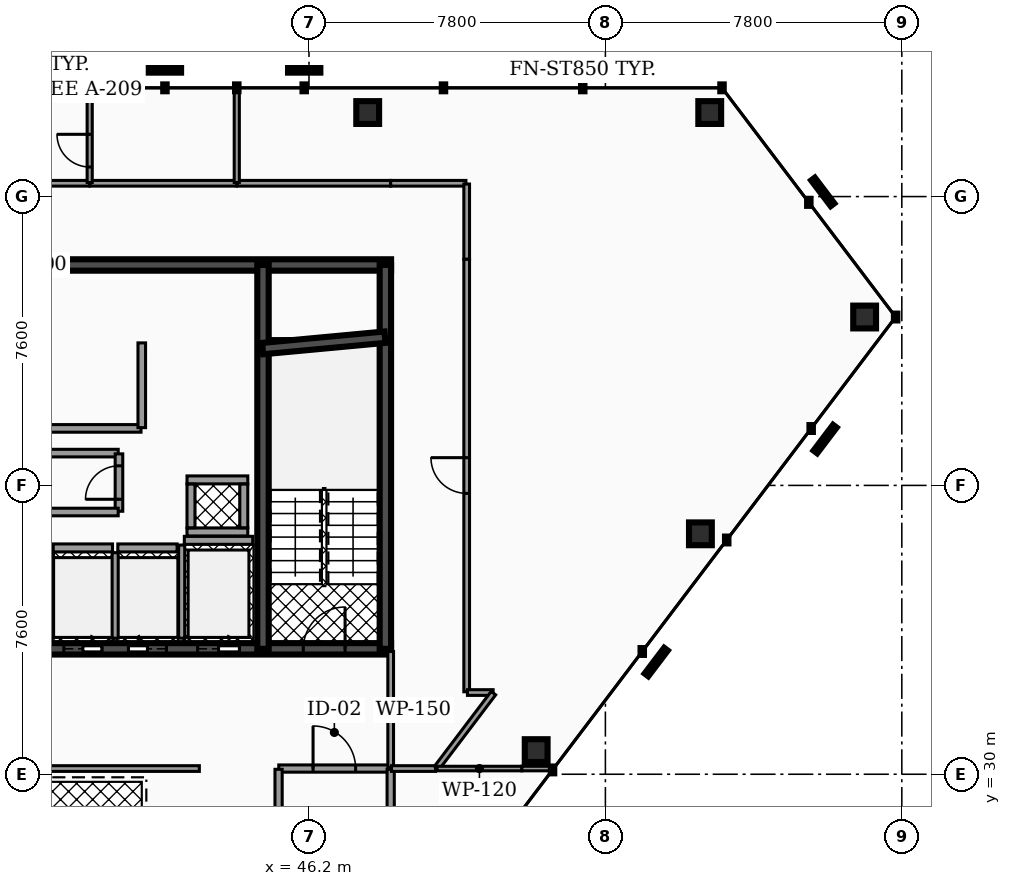
"""IFC4 building model, lengths in metres.
Left out: names, types, materials, properties, quantities, classifications, styles, units other than length and angle.
Written with IfcOpenShell. Run it as: python <this file> out.ifc"""

import sys

from ifc_helpers import new_model, si_unit, direction, frame, frame_2d, origin, origin_2d, place, context, subcontext, project, spatial, rectangle, hollow_rectangle, extrude, element, fill, save


model = new_model("IFC4")
c1 = context("Model", 3, precision=1e-05, world=origin(), true_north=direction((0.0, 1.0)))
c2 = subcontext(c1, "Body", "Model", "MODEL_VIEW")
j1 = project(units=[si_unit("LENGTHUNIT", "METRE"), si_unit("PLANEANGLEUNIT", "RADIAN")], contexts=[c1])
p1 = place(None, origin())
s1 = spatial("IfcSite", under=j1, at=p1, CompositionType="ELEMENT")
p2 = place(p1, origin())
s2 = spatial("IfcBuilding", under=s1, at=p2, CompositionType="ELEMENT")
p3 = place(p2, frame((0.0, 0.0, 242.76)))
s3 = spatial("IfcBuildingStorey", under=s2, at=p3, CompositionType="ELEMENT", Elevation=242.76)
p4 = place(p3, frame((28.5, 43.4, 0.0), z_axis=(0.0, 0.0, 1.0), x_axis=(1.0, 0.0, 0.0)))
e1 = element("IfcWall", 1, at=p4, inside=s3, PredefinedType="SHEAR", context=c2, shape_type="SweptSolid", body=[
    extrude(rectangle(XDim=19.86, YDim=0.3, at=frame_2d((9.93, 0.0))), origin(), (0.0, 0.0, 1.0), 3.18),
])
p5 = place(p3, frame((28.5, 33.3, 0.0), z_axis=(0.0, 0.0, 1.0), x_axis=(1.0, 0.0, 0.0)))
e2 = element("IfcWall", 2, at=p5, inside=s3, PredefinedType="SHEAR", context=c2, shape_type="SweptSolid", body=[
    extrude(rectangle(XDim=19.86, YDim=0.3, at=frame_2d((9.93, 0.0))), origin(), (0.0, 0.0, 1.0), 3.18),
])
p6 = place(p5, frame((3.93, 0.0, 0.0)))
e3 = element("IfcOpeningElement", 3, at=p6, cuts=e2, PredefinedType="OPENING", context=c2, shape_type="SweptSolid", body=[
    extrude(rectangle(XDim=1.1, YDim=2.15, at=frame_2d((0.55, 1.075))), frame((0.0, 0.16, 0.0), z_axis=(0.0, -1.0, 0.0), x_axis=(1.0, 0.0, 0.0)), (0.0, 0.0, 1.0), 0.32),
])
p7 = place(p5, frame((14.77, 0.0, 0.0)))
e4 = element("IfcOpeningElement", 4, at=p7, cuts=e2, PredefinedType="OPENING", context=c2, shape_type="SweptSolid", body=[
    extrude(rectangle(XDim=1.1, YDim=2.15, at=frame_2d((0.55, 1.075))), frame((0.0, 0.16, 0.0), z_axis=(0.0, -1.0, 0.0), x_axis=(1.0, 0.0, 0.0)), (0.0, 0.0, 1.0), 0.32),
])
p8 = place(p5, frame((11.25, 0.0, 0.0)))
e5 = element("IfcOpeningElement", 5, at=p8, cuts=e2, PredefinedType="OPENING", context=c2, shape_type="SweptSolid", body=[
    extrude(rectangle(XDim=1.0, YDim=2.1, at=frame_2d((0.5, 1.05))), frame((0.0, 0.16, 0.0), z_axis=(0.0, -1.0, 0.0), x_axis=(1.0, 0.0, 0.0)), (0.0, 0.0, 1.0), 0.32),
])
p9 = place(p5, frame((12.95, 0.0, 0.0)))
e6 = element("IfcOpeningElement", 6, at=p9, cuts=e2, PredefinedType="OPENING", context=c2, shape_type="SweptSolid", body=[
    extrude(rectangle(XDim=1.0, YDim=2.1, at=frame_2d((0.5, 1.05))), frame((0.0, 0.16, 0.0), z_axis=(0.0, -1.0, 0.0), x_axis=(1.0, 0.0, 0.0)), (0.0, 0.0, 1.0), 0.32),
])
p10 = place(p5, frame((5.85, 0.0, 0.0)))
e7 = element("IfcOpeningElement", 7, at=p10, cuts=e2, PredefinedType="OPENING", context=c2, shape_type="SweptSolid", body=[
    extrude(rectangle(XDim=1.0, YDim=2.1, at=frame_2d((0.5, 1.05))), frame((0.0, 0.16, 0.0), z_axis=(0.0, -1.0, 0.0), x_axis=(1.0, 0.0, 0.0)), (0.0, 0.0, 1.0), 0.32),
])
p11 = place(p5, frame((1.21, 0.0, 0.0)))
e8 = element("IfcOpeningElement", 8, at=p11, cuts=e2, PredefinedType="OPENING", context=c2, shape_type="SweptSolid", body=[
    extrude(rectangle(XDim=1.1, YDim=2.2, at=frame_2d((0.55, 1.1))), frame((0.0, 0.16, 0.0), z_axis=(0.0, -1.0, 0.0), x_axis=(1.0, 0.0, 0.0)), (0.0, 0.0, 1.0), 0.32),
])
p12 = place(p5, frame((9.34, 0.0, 0.0)))
e9 = element("IfcOpeningElement", 9, at=p12, cuts=e2, PredefinedType="OPENING", context=c2, shape_type="SweptSolid", body=[
    extrude(rectangle(XDim=1.12, YDim=2.05, at=frame_2d((0.56, 1.025))), frame((0.0, 0.16, 0.0), z_axis=(0.0, -1.0, 0.0), x_axis=(1.0, 0.0, 0.0)), (0.0, 0.0, 1.0), 0.32),
])
p13 = place(p5, frame((17.55, 0.0, 0.0)))
e10 = element("IfcOpeningElement", 10, at=p13, cuts=e2, PredefinedType="OPENING", context=c2, shape_type="SweptSolid", body=[
    extrude(rectangle(XDim=1.1, YDim=2.2, at=frame_2d((0.55, 1.1))), frame((0.0, 0.16, 0.0), z_axis=(0.0, -1.0, 0.0), x_axis=(1.0, 0.0, 0.0)), (0.0, 0.0, 1.0), 0.32),
])
for number, where, z_axis, x_axis in (
    (11, (44.99, 33.3, 0.0), (0.0, 0.0, 1.0), (0.0, 1.0, 0.0)),
    (12, (48.21, 33.3, 0.0), (0.0, 0.0, 1.0), (0.0, 1.0, 0.0)),
):
    element("IfcWall", number, at=place(p3, frame(where, z_axis=z_axis, x_axis=x_axis)), inside=s3, PredefinedType="SHEAR", context=c2, shape_type="SweptSolid", body=[
        extrude(rectangle(XDim=10.1, YDim=0.3, at=frame_2d((5.05, 0.0))), origin(), (0.0, 0.0, 1.0), 3.18),
    ])
p14 = place(p3, frame((44.98, 41.2, 0.0), z_axis=(0.0, 0.0, 1.0), x_axis=(0.995686468965, 0.09278176286, 0.0)))
e13 = element("IfcWall", 13, at=p14, inside=s3, PredefinedType="SHEAR", context=c2, shape_type="SweptSolid", body=[
    extrude(rectangle(XDim=3.234, YDim=0.3, at=frame_2d((1.617, 0.0))), origin(), (0.0, 0.0, 1.0), 3.18),
])
for number, where, z_axis, x_axis in (
    (14, (56.746, 47.411, 0.0), (0.0, 0.0, 1.0), (1.0, 0.0, 0.0)),
    (15, (47.745, 47.411, 0.0), (0.0, 0.0, 1.0), (1.0, 0.0, 0.0)),
    (16, (52.178, 30.622, 0.0), (0.0, 0.0, 1.0), (1.0, 0.0, 0.0)),
    (17, (56.5, 36.326, 0.0), (0.0, 0.0, 1.0), (1.0, 0.0, 0.0)),
    (18, (60.822, 42.031, 0.0), (0.0, 0.0, 1.0), (1.0, 0.0, 0.0)),
):
    element("IfcColumn", number, at=place(p3, frame(where, z_axis=z_axis, x_axis=x_axis)), inside=s3, PredefinedType="COLUMN", context=c2, shape_type="SweptSolid", body=[
        extrude(hollow_rectangle(XDim=0.6, YDim=0.6, WallThickness=0.03, at=origin_2d()), origin(), (0.0, 0.0, 1.0), 3.18),
    ])
p15 = place(p3, frame((42.92, 36.155, 0.0), z_axis=(0.0, 0.0, 1.0), x_axis=(1.0, 0.0, 0.0)))
e19 = element("IfcWall", 19, at=p15, inside=s3, PredefinedType="SOLIDWALL", context=c2, shape_type="SweptSolid", body=[
    extrude(rectangle(XDim=1.8, YDim=0.21, at=frame_2d((0.9, 0.0))), origin(), (0.0, 0.0, 1.0), 3.18),
])
p16 = place(p3, frame((42.85, 33.58, 0.0), z_axis=(0.0, 0.0, 1.0), x_axis=(0.0, 1.0, 0.0)))
e20 = element("IfcWall", 20, at=p16, inside=s3, PredefinedType="SOLIDWALL", context=c2, shape_type="SweptSolid", body=[
    extrude(rectangle(XDim=2.45, YDim=0.16, at=frame_2d((1.225, 0.0))), origin(), (0.0, 0.0, 1.0), 3.18),
])
p17 = place(p3, frame((39.47, 35.955, 0.0), z_axis=(0.0, 0.0, 1.0), x_axis=(1.0, 0.0, 0.0)))
e21 = element("IfcWall", 21, at=p17, inside=s3, PredefinedType="SOLIDWALL", context=c2, shape_type="SweptSolid", body=[
    extrude(rectangle(XDim=1.56, YDim=0.21, at=frame_2d((0.78, 0.0))), origin(), (0.0, 0.0, 1.0), 3.18),
])
for number, where, z_axis, x_axis in (
    (22, (39.4, 33.58, 0.0), (0.0, 0.0, 1.0), (0.0, 1.0, 0.0)),
    (23, (41.1, 33.58, 0.0), (0.0, 0.0, 1.0), (0.0, 1.0, 0.0)),
):
    element("IfcWall", number, at=place(p3, frame(where, z_axis=z_axis, x_axis=x_axis)), inside=s3, PredefinedType="SOLIDWALL", context=c2, shape_type="SweptSolid", body=[
        extrude(rectangle(XDim=2.25, YDim=0.16, at=frame_2d((1.125, 0.0))), origin(), (0.0, 0.0, 1.0), 3.18),
    ])
p18 = place(p3, frame((41.17, 35.955, 0.0), z_axis=(0.0, 0.0, 1.0), x_axis=(1.0, 0.0, 0.0)))
e24 = element("IfcWall", 24, at=p18, inside=s3, PredefinedType="SOLIDWALL", context=c2, shape_type="SweptSolid", body=[
    extrude(rectangle(XDim=1.56, YDim=0.21, at=frame_2d((0.78, 0.0))), origin(), (0.0, 0.0, 1.0), 3.18),
])
for number, where, z_axis, x_axis in (
    (25, (42.99, 36.375, 0.0), (0.0, 0.0, 1.0), (1.0, 0.0, 0.0)),
    (26, (42.99, 37.745, 0.0), (0.0, 0.0, 1.0), (1.0, 0.0, 0.0)),
):
    element("IfcWall", number, at=place(p3, frame(where, z_axis=z_axis, x_axis=x_axis)), inside=s3, PredefinedType="SOLIDWALL", context=c2, shape_type="SweptSolid", body=[
        extrude(rectangle(XDim=1.6, YDim=0.21, at=frame_2d((0.8, 0.0))), origin(), (0.0, 0.0, 1.0), 3.18),
    ])
for number, where, z_axis, x_axis in (
    (27, (43.095, 36.485, 0.0), (0.0, 0.0, 1.0), (0.0, 1.0, 0.0)),
    (28, (44.485, 36.485, 0.0), (0.0, 0.0, 1.0), (0.0, 1.0, 0.0)),
):
    element("IfcWall", number, at=place(p3, frame(where, z_axis=z_axis, x_axis=x_axis)), inside=s3, PredefinedType="SOLIDWALL", context=c2, shape_type="SweptSolid", body=[
        extrude(rectangle(XDim=1.15, YDim=0.21, at=frame_2d((0.575, 0.0))), origin(), (0.0, 0.0, 1.0), 3.18),
    ])
p19 = place(p3, frame((39.27, 38.45, 0.0), z_axis=(0.0, 0.0, 1.0), x_axis=(1.0, 0.0, 0.0)))
e29 = element("IfcWall", 29, at=p19, inside=s3, PredefinedType="PARTITIONING", context=c2, shape_type="SweptSolid", body=[
    extrude(rectangle(XDim=1.91, YDim=0.2, at=frame_2d((0.955, 0.0))), origin(), (0.0, 0.0, 1.0), 2.235),
])
p20 = place(p3, frame((41.2, 36.92, 0.0), z_axis=(0.0, 0.0, 1.0), x_axis=(0.0, 1.0, 0.0)))
e30 = element("IfcWall", 30, at=p20, inside=s3, PredefinedType="PARTITIONING", context=c2, shape_type="SweptSolid", body=[
    extrude(rectangle(XDim=1.51, YDim=0.2, at=frame_2d((0.755, 0.0))), origin(), (0.0, 0.0, 1.0), 2.235),
])
p21 = place(p20, frame((0.315, 0.0, 0.0)))
e31 = element("IfcOpeningElement", 31, at=p21, cuts=e30, PredefinedType="OPENING", context=c2, shape_type="SweptSolid", body=[
    extrude(rectangle(XDim=0.88, YDim=2.05, at=frame_2d((0.44, 1.025))), frame((0.0, 0.11, 0.0), z_axis=(0.0, -1.0, 0.0), x_axis=(1.0, 0.0, 0.0)), (0.0, 0.0, 1.0), 0.22),
])
p22 = place(p3, frame((39.27, 36.9, 0.0), z_axis=(0.0, 0.0, 1.0), x_axis=(1.0, 0.0, 0.0)))
e32 = element("IfcWall", 32, at=p22, inside=s3, PredefinedType="PARTITIONING", context=c2, shape_type="SweptSolid", body=[
    extrude(rectangle(XDim=1.91, YDim=0.2, at=frame_2d((0.955, 0.0))), origin(), (0.0, 0.0, 1.0), 2.235),
])
p23 = place(p3, frame((39.27, 39.1, 0.0), z_axis=(0.0, 0.0, 1.0), x_axis=(1.0, 0.0, 0.0)))
e33 = element("IfcWall", 33, at=p23, inside=s3, PredefinedType="PARTITIONING", context=c2, shape_type="SweptSolid", body=[
    extrude(rectangle(XDim=2.51, YDim=0.2, at=frame_2d((1.255, 0.0))), origin(), (0.0, 0.0, 1.0), 2.235),
])
p24 = place(p3, frame((41.8, 39.12, 0.0), z_axis=(0.0, 0.0, 1.0), x_axis=(0.0, 1.0, 0.0)))
e34 = element("IfcWall", 34, at=p24, inside=s3, PredefinedType="PARTITIONING", context=c2, shape_type="SweptSolid", body=[
    extrude(rectangle(XDim=2.23, YDim=0.2, at=frame_2d((1.115, 0.0))), origin(), (0.0, 0.0, 1.0), 2.235),
])
p25 = place(p3, frame((45.405, 30.15, 0.0), z_axis=(0.0, 0.0, 1.0), x_axis=(1.0, 0.0, 0.0)))
e35 = element("IfcWall", 35, at=p25, inside=s3, PredefinedType="PARTITIONING", context=c2, shape_type="SweptSolid", body=[
    extrude(rectangle(XDim=2.925, YDim=0.19, at=frame_2d((1.462, 0.0))), origin(), (0.0, 0.0, 1.0), 2.235),
])
p26 = place(p25, frame((0.903, 0.0, 0.0)))
e36 = element("IfcOpeningElement", 36, at=p26, cuts=e35, PredefinedType="OPENING", context=c2, shape_type="SweptSolid", body=[
    extrude(rectangle(XDim=1.12, YDim=2.05, at=frame_2d((0.56, 1.025))), frame((0.0, 0.105, 0.0), z_axis=(0.0, -1.0, 0.0), x_axis=(1.0, 0.0, 0.0)), (0.0, 0.0, 1.0), 0.21),
])
p27 = place(p3, frame((48.35, 30.17, 0.0), z_axis=(0.0, 0.0, 1.0), x_axis=(0.0, 1.0, 0.0)))
e37 = element("IfcWall", 37, at=p27, inside=s3, PredefinedType="PARTITIONING", context=c2, shape_type="SweptSolid", body=[
    extrude(rectangle(XDim=3.06, YDim=0.15, at=frame_2d((1.53, 0.0))), origin(), (0.0, 0.0, 1.0), 2.235),
])
p28 = place(p3, frame((33.485, 30.15, 0.0), z_axis=(0.0, 0.0, 1.0), x_axis=(1.0, 0.0, 0.0)))
e38 = element("IfcWall", 38, at=p28, inside=s3, PredefinedType="PARTITIONING", context=c2, shape_type="SweptSolid", body=[
    extrude(rectangle(XDim=9.83, YDim=0.15, at=frame_2d((4.915, 0.0))), origin(), (0.0, 0.0, 1.0), 2.235),
])
p29 = place(p28, frame((0.445, 0.0, 0.0)))
e39 = element("IfcOpeningElement", 39, at=p29, cuts=e38, PredefinedType="OPENING", context=c2, shape_type="SweptSolid", body=[
    extrude(rectangle(XDim=0.94, YDim=2.05, at=frame_2d((0.47, 1.025))), frame((0.0, 0.085, 0.0), z_axis=(0.0, -1.0, 0.0), x_axis=(1.0, 0.0, 0.0)), (0.0, 0.0, 1.0), 0.17),
])
for number, where, z_axis, x_axis in (
    (40, (45.4, 27.37, 0.0), (0.0, 0.0, 1.0), (0.0, 1.0, 0.0)),
    (41, (48.35, 27.37, 0.0), (0.0, 0.0, 1.0), (0.0, 1.0, 0.0)),
):
    element("IfcWall", number, at=place(p3, frame(where, z_axis=z_axis, x_axis=x_axis)), inside=s3, PredefinedType="PARTITIONING", context=c2, shape_type="SweptSolid", body=[
        extrude(rectangle(XDim=2.76, YDim=0.19, at=frame_2d((1.38, 0.0))), origin(), (0.0, 0.0, 1.0), 2.235),
    ])
p30 = place(p3, frame((48.37, 30.15, 0.0), z_axis=(0.0, 0.0, 1.0), x_axis=(1.0, 0.0, 0.0)))
e42 = element("IfcWall", 42, at=p30, inside=s3, PredefinedType="PARTITIONING", context=c2, shape_type="SweptSolid", body=[
    extrude(rectangle(XDim=1.16, YDim=0.15, at=frame_2d((0.58, 0.0))), origin(), (0.0, 0.0, 1.0), 2.235),
])
p31 = place(p3, frame((44.305, 45.55, 0.0), z_axis=(0.0, 0.0, 1.0), x_axis=(1.0, 0.0, 0.0)))
e43 = element("IfcWall", 43, at=p31, inside=s3, PredefinedType="PARTITIONING", context=c2, shape_type="SweptSolid", body=[
    extrude(rectangle(XDim=4.045, YDim=0.15, at=frame_2d((2.022, 0.0))), origin(), (0.0, 0.0, 1.0), 2.235),
])
for number, where, z_axis, x_axis in (
    (44, (48.35, 45.55, 0.0), (0.0, 0.0, 1.0), (1.0, 0.0, 0.0)),
    (45, (50.35, 43.55, 0.0), (0.0, 0.0, 1.0), (0.0, 1.0, 0.0)),
):
    element("IfcWall", number, at=place(p3, frame(where, z_axis=z_axis, x_axis=x_axis)), inside=s3, PredefinedType="PARTITIONING", context=c2, shape_type="SweptSolid", body=[
        extrude(rectangle(XDim=1.98, YDim=0.15, at=frame_2d((0.99, 0.0))), origin(), (0.0, 0.0, 1.0), 2.235),
    ])
p32 = place(p3, frame((50.35, 32.17, 0.0), z_axis=(0.0, 0.0, 1.0), x_axis=(0.0, 1.0, 0.0)))
e46 = element("IfcWall", 46, at=p32, inside=s3, PredefinedType="PARTITIONING", context=c2, shape_type="SweptSolid", body=[
    extrude(rectangle(XDim=11.38, YDim=0.15, at=frame_2d((5.69, 0.0))), origin(), (0.0, 0.0, 1.0), 2.235),
])
p33 = place(p32, frame((5.22, 0.0, 0.0)))
e47 = element("IfcOpeningElement", 47, at=p33, cuts=e46, PredefinedType="OPENING", context=c2, shape_type="SweptSolid", body=[
    extrude(rectangle(XDim=0.94, YDim=2.05, at=frame_2d((0.47, 1.025))), frame((0.0, 0.085, 0.0), z_axis=(0.0, -1.0, 0.0), x_axis=(1.0, 0.0, 0.0)), (0.0, 0.0, 1.0), 0.17),
])
p34 = place(p3, frame((50.37, 32.15, 0.0), z_axis=(0.0, 0.0, 1.0), x_axis=(1.0, 0.0, 0.0)))
e48 = element("IfcWall", 48, at=p34, inside=s3, PredefinedType="PARTITIONING", context=c2, shape_type="SweptSolid", body=[
    extrude(rectangle(XDim=0.675, YDim=0.15, at=frame_2d((0.338, 0.0))), origin(), (0.0, 0.0, 1.0), 2.235),
])
p35 = place(p3, frame((49.562, 30.166, 0.0), z_axis=(0.0, 0.0, 1.0), x_axis=(0.603806281462, 0.797131089889, 0.0)))
e49 = element("IfcWall", 49, at=p35, inside=s3, PredefinedType="PARTITIONING", context=c2, shape_type="SweptSolid", body=[
    extrude(rectangle(XDim=2.469, YDim=0.15, at=frame_2d((1.234, 0.0))), origin(), (0.0, 0.0, 1.0), 2.235),
])
p36 = place(p3, frame((34.629, 45.55, 0.0), z_axis=(0.0, 0.0, 1.0), x_axis=(1.0, 0.0, 0.0)))
e50 = element("IfcWall", 50, at=p36, inside=s3, PredefinedType="PARTITIONING", context=c2, shape_type="SweptSolid", body=[
    extrude(rectangle(XDim=5.796, YDim=0.15, at=frame_2d((2.898, 0.0))), origin(), (0.0, 0.0, 1.0), 2.235),
])
p37 = place(p36, frame((2.428, 0.0, 0.0)))
e51 = element("IfcOpeningElement", 51, at=p37, cuts=e50, PredefinedType="OPENING", context=c2, shape_type="SweptSolid", body=[
    extrude(rectangle(XDim=0.94, YDim=2.05, at=frame_2d((0.47, 1.025))), frame((0.0, 0.085, 0.0), z_axis=(0.0, -1.0, 0.0), x_axis=(1.0, 0.0, 0.0)), (0.0, 0.0, 1.0), 0.17),
])
p38 = place(p3, frame((40.435, 45.55, 0.0), z_axis=(0.0, 0.0, 1.0), x_axis=(1.0, 0.0, 0.0)))
e52 = element("IfcWall", 52, at=p38, inside=s3, PredefinedType="PARTITIONING", context=c2, shape_type="SweptSolid", body=[
    extrude(rectangle(XDim=3.86, YDim=0.15, at=frame_2d((1.93, 0.0))), origin(), (0.0, 0.0, 1.0), 2.235),
])
p39 = place(p3, frame((49.57, 30.15, 0.0), z_axis=(0.0, 0.0, 1.0), x_axis=(1.0, 0.0, 0.0)))
e53 = element("IfcWall", 53, at=p39, inside=s3, PredefinedType="PARTITIONING", context=c2, shape_type="SweptSolid", body=[
    extrude(rectangle(XDim=2.23, YDim=0.12, at=frame_2d((1.115, 0.0))), origin(), (0.0, 0.0, 1.0), 2.235),
])
p40 = place(p3, frame((51.8, 30.15, 0.0), z_axis=(0.0, 0.0, 1.0), x_axis=(1.0, 0.0, 0.0)))
e54 = element("IfcWall", 54, at=p40, inside=s3, PredefinedType="PARTITIONING", context=c2, shape_type="SweptSolid", body=[
    extrude(rectangle(XDim=0.822, YDim=0.12, at=frame_2d((0.411, 0.0))), origin(), (0.0, 0.0, 1.0), 2.235),
])
p41 = place(p3, frame((44.3, 45.57, 0.0), z_axis=(0.0, 0.0, 1.0), x_axis=(0.0, 1.0, 0.0)))
e55 = element("IfcWall", 55, at=p41, inside=s3, PredefinedType="PARTITIONING", context=c2, shape_type="SweptSolid", body=[
    extrude(rectangle(XDim=2.476, YDim=0.135, at=frame_2d((1.238, 0.0))), origin(), (0.0, 0.0, 1.0), 2.235),
])
p42 = place(p3, frame((40.43, 45.57, 0.0), z_axis=(0.0, 0.0, 1.0), x_axis=(0.0, 1.0, 0.0)))
e56 = element("IfcWall", 56, at=p42, inside=s3, PredefinedType="PARTITIONING", context=c2, shape_type="SweptSolid", body=[
    extrude(rectangle(XDim=2.476, YDim=0.135, at=frame_2d((1.238, 0.0))), origin(), (0.0, 0.0, 1.0), 2.235),
])
p43 = place(p42, frame((0.408, 0.0, 0.0)))
e57 = element("IfcOpeningElement", 57, at=p43, cuts=e56, PredefinedType="OPENING", context=c2, shape_type="SweptSolid", body=[
    extrude(rectangle(XDim=0.86, YDim=2.05, at=frame_2d((0.43, 1.025))), frame((0.0, 0.077, 0.0), z_axis=(0.0, -1.0, 0.0), x_axis=(1.0, 0.0, 0.0)), (0.0, 0.0, 1.0), 0.155),
])
p44 = place(p7, origin())
e58 = element("IfcDoor", 58, at=p44, inside=s3, OperationType="SLIDING_TO_RIGHT", PredefinedType="DOOR", context=c2, shape_type="SweptSolid", body=[
    extrude(rectangle(XDim=1.1, YDim=2.15, at=frame_2d((0.55, 1.075))), frame((0.0, 0.025, 0.0), z_axis=(0.0, -1.0, 0.0), x_axis=(1.0, 0.0, 0.0)), (0.0, 0.0, 1.0), 0.05),
])
fill(e4, e58)
p45 = place(p8, origin())
e59 = element("IfcDoor", 59, at=p45, inside=s3, OperationType="SLIDING_TO_RIGHT", PredefinedType="DOOR", context=c2, shape_type="SweptSolid", body=[
    extrude(rectangle(XDim=1.0, YDim=2.1, at=frame_2d((0.5, 1.05))), frame((0.0, 0.025, 0.0), z_axis=(0.0, -1.0, 0.0), x_axis=(1.0, 0.0, 0.0)), (0.0, 0.0, 1.0), 0.05),
])
fill(e5, e59)
p46 = place(p9, origin())
e60 = element("IfcDoor", 60, at=p46, inside=s3, OperationType="SLIDING_TO_LEFT", PredefinedType="DOOR", context=c2, shape_type="SweptSolid", body=[
    extrude(rectangle(XDim=1.0, YDim=2.1, at=frame_2d((0.5, 1.05))), frame((0.0, 0.025, 0.0), z_axis=(0.0, -1.0, 0.0), x_axis=(1.0, 0.0, 0.0)), (0.0, 0.0, 1.0), 0.05),
])
fill(e6, e60)
p47 = place(p13, origin())
e61 = element("IfcDoor", 61, at=p47, inside=s3, OperationType="SINGLE_SWING_RIGHT", PredefinedType="DOOR", context=c2, shape_type="SweptSolid", body=[
    extrude(rectangle(XDim=1.1, YDim=2.2, at=frame_2d((0.55, 1.1))), frame((0.0, 0.025, 0.0), z_axis=(0.0, -1.0, 0.0), x_axis=(1.0, 0.0, 0.0)), (0.0, 0.0, 1.0), 0.05),
])
fill(e10, e61)
p48 = place(p21, origin())
e62 = element("IfcDoor", 62, at=p48, inside=s3, OperationType="SINGLE_SWING_LEFT", PredefinedType="DOOR", context=c2, shape_type="SweptSolid", body=[
    extrude(rectangle(XDim=0.88, YDim=2.05, at=frame_2d((0.44, 1.025))), frame((0.0, 0.025, 0.0), z_axis=(0.0, -1.0, 0.0), x_axis=(1.0, 0.0, 0.0)), (0.0, 0.0, 1.0), 0.05),
])
fill(e31, e62)
p49 = place(p26, origin())
e63 = element("IfcDoor", 63, at=p49, inside=s3, OperationType="SINGLE_SWING_LEFT", PredefinedType="DOOR", context=c2, shape_type="SweptSolid", body=[
    extrude(rectangle(XDim=1.12, YDim=2.05, at=frame_2d((0.56, 1.025))), frame((0.0, 0.025, 0.0), z_axis=(0.0, -1.0, 0.0), x_axis=(1.0, 0.0, 0.0)), (0.0, 0.0, 1.0), 0.05),
])
fill(e36, e63)
p50 = place(p33, origin())
e64 = element("IfcDoor", 64, at=p50, inside=s3, OperationType="SINGLE_SWING_RIGHT", PredefinedType="DOOR", context=c2, shape_type="SweptSolid", body=[
    extrude(rectangle(XDim=0.94, YDim=2.05, at=frame_2d((0.47, 1.025))), frame((0.0, 0.025, 0.0), z_axis=(0.0, -1.0, 0.0), x_axis=(1.0, 0.0, 0.0)), (0.0, 0.0, 1.0), 0.05),
])
fill(e47, e64)
p51 = place(p43, origin())
e65 = element("IfcDoor", 65, at=p51, inside=s3, OperationType="SINGLE_SWING_RIGHT", PredefinedType="DOOR", context=c2, shape_type="SweptSolid", body=[
    extrude(rectangle(XDim=0.86, YDim=2.05, at=frame_2d((0.43, 1.025))), frame((0.0, 0.025, 0.0), z_axis=(0.0, -1.0, 0.0), x_axis=(1.0, 0.0, 0.0)), (0.0, 0.0, 1.0), 0.05),
])
fill(e57, e65)
save(model, sys.argv[1])
